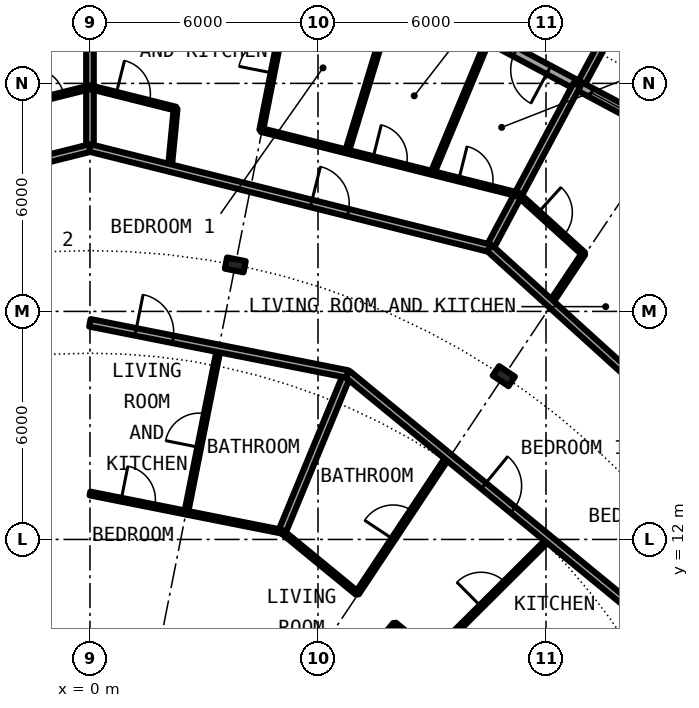
"""IFC4 building model, lengths in metres.
Left out: names, types, materials, properties, quantities, classifications, styles, units other than length and angle.
Written with IfcOpenShell. Run it as: python <this file> out.ifc"""

import sys

from ifc_helpers import new_model, si_unit, direction, frame, frame_2d, origin, origin_2d, place, context, subcontext, project, spatial, rectangle, i_section, extrude, element, fill, save


model = new_model("IFC4")
c1 = context("Model", 3, precision=1e-05, world=origin(), true_north=direction((0.0, 1.0)))
c2 = subcontext(c1, "Body", "Model", "MODEL_VIEW")
j1 = project(units=[si_unit("LENGTHUNIT", "METRE"), si_unit("PLANEANGLEUNIT", "RADIAN")], contexts=[c1])
p1 = place(None, origin())
s1 = spatial("IfcSite", under=j1, at=p1, CompositionType="ELEMENT")
p2 = place(p1, origin())
s2 = spatial("IfcBuilding", under=s1, at=p2, CompositionType="ELEMENT")
p3 = place(p2, frame((0.0, 0.0, 161.6)))
s3 = spatial("IfcBuildingStorey", under=s2, at=p3, CompositionType="ELEMENT", Elevation=161.6)
for number, where, z_axis, x_axis in (
    (1, (10.889, 16.297, 0.0), (0.0, 0.0, 1.0), (0.556, 0.831, 0.0)),
    (2, (3.824, 19.223, 0.0), (0.0, 0.0, 1.0), (0.195, 0.981, 0.0)),
):
    element("IfcColumn", number, at=place(p3, frame(where, z_axis=z_axis, x_axis=x_axis)), inside=s3, PredefinedType="COLUMN", context=c2, shape_type="SweptSolid", body=[
        extrude(i_section(OverallWidth=0.3, OverallDepth=0.5, WebThickness=0.014, FlangeThickness=0.028, FilletRadius=0.027, at=origin_2d()), origin(), (0.0, 0.0, 1.0), 3.05),
    ])
p4 = place(p3, frame((15.167, 22.699, 0.0), z_axis=(0.0, 0.0, 1.0), x_axis=(-0.881915646801, 0.471407246368, 0.0)))
e3 = element("IfcWall", 3, at=p4, inside=s3, PredefinedType="SOLIDWALL", context=c2, shape_type="SweptSolid", body=[
    extrude(rectangle(XDim=5.352, YDim=0.25, at=frame_2d((2.676, 0.0))), origin(), (0.0, 0.0, 1.0), 2.7),
])
p5 = place(p4, frame((0.441, 0.0, 0.3)))
e4 = element("IfcOpeningElement", 4, at=p5, cuts=e3, PredefinedType="OPENING", context=c2, shape_type="SweptSolid", body=[
    extrude(rectangle(XDim=1.8, YDim=2.1, at=frame_2d((0.9, 1.05))), frame((0.0, 0.135, 0.0), z_axis=(0.0, -1.0, 0.0), x_axis=(1.0, 0.0, 0.0)), (0.0, 0.0, 1.0), 0.27),
])
p6 = place(p4, frame((3.51, 0.0, 0.0)))
e5 = element("IfcOpeningElement", 5, at=p6, cuts=e3, PredefinedType="OPENING", context=c2, shape_type="SweptSolid", body=[
    extrude(rectangle(XDim=1.0, YDim=2.2, at=frame_2d((0.5, 1.1))), frame((0.0, 0.135, 0.0), z_axis=(0.0, -1.0, 0.0), x_axis=(1.0, 0.0, 0.0)), (0.0, 0.0, 1.0), 0.27),
])
p7 = place(p3, frame((12.945, 24.029, -0.03), z_axis=(0.0, 0.0, 1.0), x_axis=(0.474424310775, 0.88029629861, 0.0)))
e6 = element("IfcWall", 6, at=p7, inside=s3, PredefinedType="SOLIDWALL", context=c2, shape_type="SweptSolid", body=[
    extrude(rectangle(XDim=3.006, YDim=0.2, at=frame_2d((1.503, 0.0))), origin(), (0.0, 0.0, 1.0), 2.73),
])
p8 = place(p3, frame((0.0, 22.3, 0.0), z_axis=(0.0, 0.0, 1.0), x_axis=(0.0, 1.0, 0.0)))
e7 = element("IfcWall", 7, at=p8, inside=s3, PredefinedType="PARTITIONING", context=c2, shape_type="SweptSolid", body=[
    extrude(rectangle(XDim=4.875, YDim=0.2, at=frame_2d((2.438, 0.0))), origin(), (0.0, 0.0, 1.0), 2.7),
])
p9 = place(p3, frame((2.102, 21.773, 0.0), z_axis=(0.0, 0.0, 1.0), x_axis=(0.09608568494, 0.995373066317, 0.0)))
e8 = element("IfcWall", 8, at=p9, inside=s3, PredefinedType="PARTITIONING", context=c2, shape_type="SweptSolid", body=[
    extrude(rectangle(XDim=1.57, YDim=0.1, at=frame_2d((0.785, 0.0))), origin(), (0.0, 0.0, 1.0), 2.7),
])
p10 = place(p3, frame((2.532, 12.705, 0.0), z_axis=(0.0, 0.0, 1.0), x_axis=(0.195273978699, 0.980748730941, 0.0)))
e9 = element("IfcWall", 9, at=p10, inside=s3, PredefinedType="PARTITIONING", context=c2, shape_type="SweptSolid", body=[
    extrude(rectangle(XDim=4.405, YDim=0.1, at=frame_2d((2.202, 0.0))), origin(), (0.0, 0.0, 1.0), 2.7),
])
p11 = place(p10, frame((1.752, 0.0, 0.0)))
e10 = element("IfcOpeningElement", 10, at=p11, cuts=e9, PredefinedType="OPENING", context=c2, shape_type="SweptSolid", body=[
    extrude(rectangle(XDim=0.9, YDim=2.3, at=frame_2d((0.45, 1.15))), frame((0.0, 0.06, 0.0), z_axis=(0.0, -1.0, 0.0), x_axis=(1.0, 0.0, 0.0)), (0.0, 0.0, 1.0), 0.12),
])
p12 = place(p3, frame((4.507, 22.771, 0.0), z_axis=(0.0, 0.0, 1.0), x_axis=(0.194030211642, 0.980995554001, 0.0)))
e11 = element("IfcWall", 11, at=p12, inside=s3, PredefinedType="PARTITIONING", context=c2, shape_type="SweptSolid", body=[
    extrude(rectangle(XDim=3.962, YDim=0.1, at=frame_2d((1.981, 0.0))), origin(), (0.0, 0.0, 1.0), 2.7),
])
p13 = place(p12, frame((1.531, 0.0, 0.0)))
e12 = element("IfcOpeningElement", 12, at=p13, cuts=e11, PredefinedType="OPENING", context=c2, shape_type="SweptSolid", body=[
    extrude(rectangle(XDim=0.9, YDim=2.3, at=frame_2d((0.45, 1.15))), frame((0.0, 0.06, 0.0), z_axis=(0.0, -1.0, 0.0), x_axis=(1.0, 0.0, 0.0)), (0.0, 0.0, 1.0), 0.12),
])
p14 = place(p3, frame((4.898, 5.968, 0.0), z_axis=(0.0, 0.0, 1.0), x_axis=(0.634401778971, 0.773003481776, 0.0)))
e13 = element("IfcWall", 13, at=p14, inside=s3, PredefinedType="PARTITIONING", context=c2, shape_type="SweptSolid", body=[
    extrude(rectangle(XDim=4.92, YDim=0.1, at=frame_2d((2.46, 0.0))), origin(), (0.0, 0.0, 1.0), 2.7),
])
p15 = place(p14, frame((2.01, 0.0, 0.0)))
e14 = element("IfcOpeningElement", 14, at=p15, cuts=e13, PredefinedType="OPENING", context=c2, shape_type="SweptSolid", body=[
    extrude(rectangle(XDim=0.9, YDim=2.3, at=frame_2d((0.45, 1.15))), frame((0.0, 0.06, 0.0), z_axis=(0.0, -1.0, 0.0), x_axis=(1.0, 0.0, 0.0)), (0.0, 0.0, 1.0), 0.12),
])
p16 = place(p3, frame((5.055, 12.204, 0.0), z_axis=(0.0, 0.0, 1.0), x_axis=(0.38258387732, 0.923920763277, 0.0)))
e15 = element("IfcWall", 15, at=p16, inside=s3, PredefinedType="PARTITIONING", context=c2, shape_type="SweptSolid", body=[
    extrude(rectangle(XDim=4.49, YDim=0.2, at=frame_2d((2.245, 0.0))), origin(), (0.0, 0.0, 1.0), 2.7),
])
p17 = place(p3, frame((6.763, 22.206, 0.0), z_axis=(0.0, 0.0, 1.0), x_axis=(0.291291575636, 0.956634317785, 0.0)))
e16 = element("IfcWall", 16, at=p17, inside=s3, PredefinedType="PARTITIONING", context=c2, shape_type="SweptSolid", body=[
    extrude(rectangle(XDim=3.962, YDim=0.1, at=frame_2d((1.981, 0.0))), origin(), (0.0, 0.0, 1.0), 2.7),
])
p18 = place(p3, frame((7.031, 10.582, 0.0), z_axis=(0.0, 0.0, 1.0), x_axis=(0.553303732327, 0.832979579457, 0.0)))
e17 = element("IfcWall", 17, at=p18, inside=s3, PredefinedType="PARTITIONING", context=c2, shape_type="SweptSolid", body=[
    extrude(rectangle(XDim=4.319, YDim=0.1, at=frame_2d((2.16, 0.0))), origin(), (0.0, 0.0, 1.0), 2.7),
])
p19 = place(p18, frame((1.71, 0.0, 0.0)))
e18 = element("IfcOpeningElement", 18, at=p19, cuts=e17, PredefinedType="OPENING", context=c2, shape_type="SweptSolid", body=[
    extrude(rectangle(XDim=0.9, YDim=2.3, at=frame_2d((0.45, 1.15))), frame((0.0, 0.06, 0.0), z_axis=(0.0, -1.0, 0.0), x_axis=(1.0, 0.0, 0.0)), (0.0, 0.0, 1.0), 0.12),
])
p20 = place(p3, frame((9.013, 21.642, 0.0), z_axis=(0.0, 0.0, 1.0), x_axis=(0.384420204655, 0.923158223845, 0.0)))
e19 = element("IfcWall", 19, at=p20, inside=s3, PredefinedType="PARTITIONING", context=c2, shape_type="SweptSolid", body=[
    extrude(rectangle(XDim=3.73, YDim=0.1, at=frame_2d((1.865, 0.0))), origin(), (0.0, 0.0, 1.0), 2.7),
])
p21 = place(p3, frame((9.148, 9.1, 0.0), z_axis=(0.0, 0.0, 1.0), x_axis=(0.708822693149, 0.705386695138, 0.0)))
e20 = element("IfcWall", 20, at=p21, inside=s3, PredefinedType="PARTITIONING", context=c2, shape_type="SweptSolid", body=[
    extrude(rectangle(XDim=4.121, YDim=0.1, at=frame_2d((2.061, 0.0))), origin(), (0.0, 0.0, 1.0), 2.7),
])
p22 = place(p21, frame((1.611, 0.0, 0.0)))
e21 = element("IfcOpeningElement", 21, at=p22, cuts=e20, PredefinedType="OPENING", context=c2, shape_type="SweptSolid", body=[
    extrude(rectangle(XDim=0.9, YDim=2.3, at=frame_2d((0.45, 1.15))), frame((0.0, 0.06, 0.0), z_axis=(0.0, -1.0, 0.0), x_axis=(1.0, 0.0, 0.0)), (0.0, 0.0, 1.0), 0.12),
])
p23 = place(p3, frame((10.516, 19.665, 0.0), z_axis=(0.0, 0.0, 1.0), x_axis=(0.471388689095, 0.881925565903, 0.0)))
e22 = element("IfcWall", 22, at=p23, inside=s3, PredefinedType="PARTITIONING", context=c2, shape_type="SweptSolid", body=[
    extrude(rectangle(XDim=4.875, YDim=0.2, at=frame_2d((2.438, 0.0))), origin(), (0.0, 0.0, 1.0), 2.7),
])
p24 = place(p3, frame((12.118, 18.211, 0.0), z_axis=(0.0, 0.0, 1.0), x_axis=(0.554125989098, 0.832432813028, 0.0)))
e23 = element("IfcWall", 23, at=p24, inside=s3, PredefinedType="PARTITIONING", context=c2, shape_type="SweptSolid", body=[
    extrude(rectangle(XDim=1.57, YDim=0.1, at=frame_2d((0.785, 0.0))), origin(), (0.0, 0.0, 1.0), 2.7),
])
p25 = place(p3, frame((5.058, 12.203, 0.0), z_axis=(0.0, 0.0, 1.0), x_axis=(0.772764723682, -0.634692588449, 0.0)))
e24 = element("IfcWall", 24, at=p25, inside=s3, PredefinedType="PARTITIONING", context=c2, shape_type="SweptSolid", body=[
    extrude(rectangle(XDim=2.557, YDim=0.1, at=frame_2d((1.278, 0.0))), origin(), (0.0, 0.0, 1.0), 2.7),
])
p26 = place(p3, frame((8.019, 9.771, 0.0), z_axis=(0.0, 0.0, 1.0), x_axis=(0.772730269942, -0.634734534995, 0.0)))
e25 = element("IfcWall", 25, at=p26, inside=s3, PredefinedType="PARTITIONING", context=c2, shape_type="SweptSolid", body=[
    extrude(rectangle(XDim=1.065, YDim=0.1, at=frame_2d((0.532, 0.0))), origin(), (0.0, 0.0, 1.0), 2.7),
])
p27 = place(p3, frame((0.0, 13.209, 0.0), z_axis=(0.0, 0.0, 1.0), x_axis=(0.980766092797, -0.195186759846, 0.0)))
e26 = element("IfcWall", 26, at=p27, inside=s3, PredefinedType="PARTITIONING", context=c2, shape_type="SweptSolid", body=[
    extrude(rectangle(XDim=2.577, YDim=0.1, at=frame_2d((1.288, 0.0))), origin(), (0.0, 0.0, 1.0), 2.7),
])
p28 = place(p27, frame((0.838, 0.0, 0.0)))
e27 = element("IfcOpeningElement", 27, at=p28, cuts=e26, PredefinedType="OPENING", context=c2, shape_type="SweptSolid", body=[
    extrude(rectangle(XDim=0.9, YDim=2.3, at=frame_2d((0.45, 1.15))), frame((0.0, 0.06, 0.0), z_axis=(0.0, -1.0, 0.0), x_axis=(1.0, 0.0, 0.0)), (0.0, 0.0, 1.0), 0.12),
])
p29 = place(p3, frame((6.773, 16.353, 0.0), z_axis=(0.0, 0.0, 1.0), x_axis=(0.773034536097, -0.634363938131, 0.0)))
e28 = element("IfcWall", 28, at=p29, inside=s3, PredefinedType="PARTITIONING", context=c2, shape_type="SweptSolid", body=[
    extrude(rectangle(XDim=10.277, YDim=0.2, at=frame_2d((5.138, 0.0))), origin(), (0.0, 0.0, 1.0), 2.7),
])
p30 = place(p29, frame((4.638, 0.0, 0.0)))
e29 = element("IfcOpeningElement", 29, at=p30, cuts=e28, PredefinedType="OPENING", context=c2, shape_type="SweptSolid", body=[
    extrude(rectangle(XDim=1.0, YDim=2.3, at=frame_2d((0.5, 1.15))), frame((0.0, 0.11, 0.0), z_axis=(0.0, -1.0, 0.0), x_axis=(1.0, 0.0, 0.0)), (0.0, 0.0, 1.0), 0.22),
])
p31 = place(p3, frame((-0.002, 17.7, 0.0), z_axis=(0.0, 0.0, 1.0), x_axis=(0.980804334721, -0.194994505033, 0.0)))
e30 = element("IfcWall", 30, at=p31, inside=s3, PredefinedType="PARTITIONING", context=c2, shape_type="SweptSolid", body=[
    extrude(rectangle(XDim=6.907, YDim=0.2, at=frame_2d((3.454, 0.0))), origin(), (0.0, 0.0, 1.0), 2.7),
])
p32 = place(p31, frame((1.228, 0.0, 0.0)))
e31 = element("IfcOpeningElement", 31, at=p32, cuts=e30, PredefinedType="OPENING", context=c2, shape_type="SweptSolid", body=[
    extrude(rectangle(XDim=1.0, YDim=2.3, at=frame_2d((0.5, 1.15))), frame((0.0, 0.11, 0.0), z_axis=(0.0, -1.0, 0.0), x_axis=(1.0, 0.0, 0.0)), (0.0, 0.0, 1.0), 0.22),
])
p33 = place(p3, frame((-10.512, 19.667, 0.0), z_axis=(0.0, 0.0, 1.0), x_axis=(0.970086843848, 0.242758141765, 0.0)))
e32 = element("IfcWall", 32, at=p33, inside=s3, PredefinedType="PARTITIONING", context=c2, shape_type="SweptSolid", body=[
    extrude(rectangle(XDim=10.842, YDim=0.2, at=frame_2d((5.421, 0.0))), origin(), (0.0, 0.0, 1.0), 2.7),
])
p34 = place(p33, frame((6.002, 0.0, 0.0)))
e33 = element("IfcOpeningElement", 33, at=p34, cuts=e32, PredefinedType="OPENING", context=c2, shape_type="SweptSolid", body=[
    extrude(rectangle(XDim=1.0, YDim=2.3, at=frame_2d((0.5, 1.15))), frame((0.0, 0.11, 0.0), z_axis=(0.0, -1.0, 0.0), x_axis=(1.0, 0.0, 0.0)), (0.0, 0.0, 1.0), 0.22),
])
p35 = place(p3, frame((0.0, 22.3, 0.0), z_axis=(0.0, 0.0, 1.0), x_axis=(0.969975381822, -0.243203122222, 0.0)))
e34 = element("IfcWall", 34, at=p35, inside=s3, PredefinedType="PARTITIONING", context=c2, shape_type="SweptSolid", body=[
    extrude(rectangle(XDim=10.843, YDim=0.2, at=frame_2d((5.421, 0.0))), origin(), (0.0, 0.0, 1.0), 2.7),
])
p36 = place(p35, frame((6.002, 0.0, 0.0)))
e35 = element("IfcOpeningElement", 35, at=p36, cuts=e34, PredefinedType="OPENING", context=c2, shape_type="SweptSolid", body=[
    extrude(rectangle(XDim=1.0, YDim=2.3, at=frame_2d((0.5, 1.15))), frame((0.0, 0.11, 0.0), z_axis=(0.0, -1.0, 0.0), x_axis=(1.0, 0.0, 0.0)), (0.0, 0.0, 1.0), 0.22),
])
p37 = place(p3, frame((10.512, 19.667, 0.0), z_axis=(0.0, 0.0, 1.0), x_axis=(0.740849323054, -0.67167125927, 0.0)))
e36 = element("IfcWall", 36, at=p37, inside=s3, PredefinedType="PARTITIONING", context=c2, shape_type="SweptSolid", body=[
    extrude(rectangle(XDim=10.842, YDim=0.2, at=frame_2d((5.421, 0.0))), origin(), (0.0, 0.0, 1.0), 2.7),
])
p38 = place(p37, frame((6.003, 0.0, 0.0)))
e37 = element("IfcOpeningElement", 37, at=p38, cuts=e36, PredefinedType="OPENING", context=c2, shape_type="SweptSolid", body=[
    extrude(rectangle(XDim=1.0, YDim=2.3, at=frame_2d((0.5, 1.15))), frame((0.0, 0.11, 0.0), z_axis=(0.0, -1.0, 0.0), x_axis=(1.0, 0.0, 0.0)), (0.0, 0.0, 1.0), 0.22),
])
p39 = place(p3, frame((-6.76, 22.206, 0.0), z_axis=(0.0, 0.0, 1.0), x_axis=(0.970070358667, 0.242824008772, 0.0)))
e38 = element("IfcWall", 38, at=p39, inside=s3, PredefinedType="PARTITIONING", context=c2, shape_type="SweptSolid", body=[
    extrude(rectangle(XDim=6.972, YDim=0.1, at=frame_2d((3.486, 0.0))), origin(), (0.0, 0.0, 1.0), 2.7),
])
p40 = place(p39, frame((3.037, 0.0, 0.0)))
e39 = element("IfcOpeningElement", 39, at=p40, cuts=e38, PredefinedType="OPENING", context=c2, shape_type="SweptSolid", body=[
    extrude(rectangle(XDim=0.9, YDim=2.3, at=frame_2d((0.45, 1.15))), frame((0.0, 0.06, 0.0), z_axis=(0.0, -1.0, 0.0), x_axis=(1.0, 0.0, 0.0)), (0.0, 0.0, 1.0), 0.12),
])
p41 = place(p39, frame((5.357, 0.0, 0.0)))
e40 = element("IfcOpeningElement", 40, at=p41, cuts=e38, PredefinedType="OPENING", context=c2, shape_type="SweptSolid", body=[
    extrude(rectangle(XDim=0.9, YDim=2.3, at=frame_2d((0.45, 1.15))), frame((0.0, 0.06, 0.0), z_axis=(0.0, -1.0, 0.0), x_axis=(1.0, 0.0, 0.0)), (0.0, 0.0, 1.0), 0.12),
])
p42 = place(p3, frame((0.003, 23.899, 0.0), z_axis=(0.0, 0.0, 1.0), x_axis=(0.970074448647, -0.242807668911, 0.0)))
e41 = element("IfcWall", 41, at=p42, inside=s3, PredefinedType="PARTITIONING", context=c2, shape_type="SweptSolid", body=[
    extrude(rectangle(XDim=2.323, YDim=0.1, at=frame_2d((1.161, 0.0))), origin(), (0.0, 0.0, 1.0), 2.7),
])
p43 = place(p42, frame((0.708, 0.0, 0.0)))
e42 = element("IfcOpeningElement", 42, at=p43, cuts=e41, PredefinedType="OPENING", context=c2, shape_type="SweptSolid", body=[
    extrude(rectangle(XDim=0.9, YDim=2.3, at=frame_2d((0.45, 1.15))), frame((0.0, 0.06, 0.0), z_axis=(0.0, -1.0, 0.0), x_axis=(1.0, 0.0, 0.0)), (0.0, 0.0, 1.0), 0.12),
])
p44 = place(p3, frame((4.507, 22.771, 0.0), z_axis=(0.0, 0.0, 1.0), x_axis=(0.970020829306, -0.243021790611, 0.0)))
e43 = element("IfcWall", 43, at=p44, inside=s3, PredefinedType="PARTITIONING", context=c2, shape_type="SweptSolid", body=[
    extrude(rectangle(XDim=6.971, YDim=0.1, at=frame_2d((3.485, 0.0))), origin(), (0.0, 0.0, 1.0), 2.7),
])
p45 = place(p44, frame((3.031, 0.0, 0.0)))
e44 = element("IfcOpeningElement", 44, at=p45, cuts=e43, PredefinedType="OPENING", context=c2, shape_type="SweptSolid", body=[
    extrude(rectangle(XDim=0.9, YDim=2.3, at=frame_2d((0.45, 1.15))), frame((0.0, 0.06, 0.0), z_axis=(0.0, -1.0, 0.0), x_axis=(1.0, 0.0, 0.0)), (0.0, 0.0, 1.0), 0.12),
])
p46 = place(p44, frame((5.358, 0.0, 0.0)))
e45 = element("IfcOpeningElement", 45, at=p46, cuts=e43, PredefinedType="OPENING", context=c2, shape_type="SweptSolid", body=[
    extrude(rectangle(XDim=0.9, YDim=2.3, at=frame_2d((0.45, 1.15))), frame((0.0, 0.06, 0.0), z_axis=(0.0, -1.0, 0.0), x_axis=(1.0, 0.0, 0.0)), (0.0, 0.0, 1.0), 0.12),
])
p47 = place(p3, frame((11.271, 21.074, 0.0), z_axis=(0.0, 0.0, 1.0), x_axis=(0.74087097024, -0.671647381783, 0.0)))
e46 = element("IfcWall", 46, at=p47, inside=s3, PredefinedType="PARTITIONING", context=c2, shape_type="SweptSolid", body=[
    extrude(rectangle(XDim=2.324, YDim=0.1, at=frame_2d((1.162, 0.0))), origin(), (0.0, 0.0, 1.0), 2.7),
])
p48 = place(p47, frame((0.705, 0.0, 0.0)))
e47 = element("IfcOpeningElement", 47, at=p48, cuts=e46, PredefinedType="OPENING", context=c2, shape_type="SweptSolid", body=[
    extrude(rectangle(XDim=0.9, YDim=2.3, at=frame_2d((0.45, 1.15))), frame((0.0, 0.06, 0.0), z_axis=(0.0, -1.0, 0.0), x_axis=(1.0, 0.0, 0.0)), (0.0, 0.0, 1.0), 0.12),
])
p49 = place(p3, frame((5.035, 12.208, 0.0), z_axis=(0.0, 0.0, 1.0), x_axis=(-0.980857356895, 0.194727618547, 0.0)))
e48 = element("IfcWall", 48, at=p49, inside=s3, PredefinedType="PARTITIONING", context=c2, shape_type="SweptSolid", body=[
    extrude(rectangle(XDim=2.536, YDim=0.1, at=frame_2d((1.268, 0.0))), origin(), (0.0, 0.0, 1.0), 2.7),
])
p50 = place(p5, origin())
e49 = element("IfcWindow", 49, at=p50, inside=s3, PartitioningType="SINGLE_PANEL", PredefinedType="WINDOW", context=c2, shape_type="SweptSolid", body=[
    extrude(rectangle(XDim=1.8, YDim=2.1, at=frame_2d((0.9, 1.05))), frame((0.0, 0.03, 0.0), z_axis=(0.0, -1.0, 0.0), x_axis=(1.0, 0.0, 0.0)), (0.0, 0.0, 1.0), 0.06),
])
fill(e4, e49)
p51 = place(p6, origin())
e50 = element("IfcDoor", 50, at=p51, inside=s3, OperationType="SINGLE_SWING_LEFT", PredefinedType="DOOR", context=c2, shape_type="SweptSolid", body=[
    extrude(rectangle(XDim=1.0, YDim=2.2, at=frame_2d((0.5, 1.1))), frame((0.0, 0.025, 0.0), z_axis=(0.0, -1.0, 0.0), x_axis=(1.0, 0.0, 0.0)), (0.0, 0.0, 1.0), 0.05),
])
fill(e5, e50)
p52 = place(p48, origin())
e51 = element("IfcDoor", 51, at=p52, inside=s3, OperationType="SINGLE_SWING_LEFT", PredefinedType="DOOR", context=c2, shape_type="SweptSolid", body=[
    extrude(rectangle(XDim=0.9, YDim=2.3, at=frame_2d((0.45, 1.15))), frame((0.0, 0.025, 0.0), z_axis=(0.0, -1.0, 0.0), x_axis=(1.0, 0.0, 0.0)), (0.0, 0.0, 1.0), 0.05),
])
fill(e47, e51)
p53 = place(p36, origin())
e52 = element("IfcDoor", 52, at=p53, inside=s3, OperationType="SINGLE_SWING_RIGHT", PredefinedType="DOOR", context=c2, shape_type="SweptSolid", body=[
    extrude(rectangle(XDim=1.0, YDim=2.3, at=frame_2d((0.5, 1.15))), frame((0.0, 0.025, 0.0), z_axis=(0.0, -1.0, 0.0), x_axis=(1.0, 0.0, 0.0)), (0.0, 0.0, 1.0), 0.05),
])
fill(e35, e52)
p54 = place(p43, origin())
e53 = element("IfcDoor", 53, at=p54, inside=s3, OperationType="SINGLE_SWING_LEFT", PredefinedType="DOOR", context=c2, shape_type="SweptSolid", body=[
    extrude(rectangle(XDim=0.9, YDim=2.3, at=frame_2d((0.45, 1.15))), frame((0.0, 0.025, 0.0), z_axis=(0.0, -1.0, 0.0), x_axis=(1.0, 0.0, 0.0)), (0.0, 0.0, 1.0), 0.05),
])
fill(e42, e53)
p55 = place(p13, origin())
e54 = element("IfcDoor", 54, at=p55, inside=s3, OperationType="SINGLE_SWING_RIGHT", PredefinedType="DOOR", context=c2, shape_type="SweptSolid", body=[
    extrude(rectangle(XDim=0.9, YDim=2.3, at=frame_2d((0.45, 1.15))), frame((0.0, 0.025, 0.0), z_axis=(0.0, -1.0, 0.0), x_axis=(1.0, 0.0, 0.0)), (0.0, 0.0, 1.0), 0.05),
])
fill(e12, e54)
p56 = place(p45, origin())
e55 = element("IfcDoor", 55, at=p56, inside=s3, OperationType="SINGLE_SWING_LEFT", PredefinedType="DOOR", context=c2, shape_type="SweptSolid", body=[
    extrude(rectangle(XDim=0.9, YDim=2.3, at=frame_2d((0.45, 1.15))), frame((0.0, 0.025, 0.0), z_axis=(0.0, -1.0, 0.0), x_axis=(1.0, 0.0, 0.0)), (0.0, 0.0, 1.0), 0.05),
])
fill(e44, e55)
p57 = place(p46, origin())
e56 = element("IfcDoor", 56, at=p57, inside=s3, OperationType="SINGLE_SWING_RIGHT", PredefinedType="DOOR", context=c2, shape_type="SweptSolid", body=[
    extrude(rectangle(XDim=0.9, YDim=2.3, at=frame_2d((0.45, 1.15))), frame((0.0, 0.025, 0.0), z_axis=(0.0, -1.0, 0.0), x_axis=(1.0, 0.0, 0.0)), (0.0, 0.0, 1.0), 0.05),
])
fill(e45, e56)
p58 = place(p41, origin())
e57 = element("IfcDoor", 57, at=p58, inside=s3, OperationType="SINGLE_SWING_RIGHT", PredefinedType="DOOR", context=c2, shape_type="SweptSolid", body=[
    extrude(rectangle(XDim=0.9, YDim=2.3, at=frame_2d((0.45, 1.15))), frame((0.0, 0.025, 0.0), z_axis=(0.0, -1.0, 0.0), x_axis=(1.0, 0.0, 0.0)), (0.0, 0.0, 1.0), 0.05),
])
fill(e40, e57)
p59 = place(p30, origin())
e58 = element("IfcDoor", 58, at=p59, inside=s3, OperationType="SINGLE_SWING_RIGHT", PredefinedType="DOOR", context=c2, shape_type="SweptSolid", body=[
    extrude(rectangle(XDim=1.0, YDim=2.3, at=frame_2d((0.5, 1.15))), frame((0.0, 0.025, 0.0), z_axis=(0.0, -1.0, 0.0), x_axis=(1.0, 0.0, 0.0)), (0.0, 0.0, 1.0), 0.05),
])
fill(e29, e58)
p60 = place(p19, origin())
e59 = element("IfcDoor", 59, at=p60, inside=s3, OperationType="SINGLE_SWING_LEFT", PredefinedType="DOOR", context=c2, shape_type="SweptSolid", body=[
    extrude(rectangle(XDim=0.9, YDim=2.3, at=frame_2d((0.45, 1.15))), frame((0.0, 0.025, 0.0), z_axis=(0.0, -1.0, 0.0), x_axis=(1.0, 0.0, 0.0)), (0.0, 0.0, 1.0), 0.05),
])
fill(e18, e59)
p61 = place(p22, origin())
e60 = element("IfcDoor", 60, at=p61, inside=s3, OperationType="SINGLE_SWING_LEFT", PredefinedType="DOOR", context=c2, shape_type="SweptSolid", body=[
    extrude(rectangle(XDim=0.9, YDim=2.3, at=frame_2d((0.45, 1.15))), frame((0.0, 0.025, 0.0), z_axis=(0.0, -1.0, 0.0), x_axis=(1.0, 0.0, 0.0)), (0.0, 0.0, 1.0), 0.05),
])
fill(e21, e60)
p62 = place(p32, origin())
e61 = element("IfcDoor", 61, at=p62, inside=s3, OperationType="SINGLE_SWING_LEFT", PredefinedType="DOOR", context=c2, shape_type="SweptSolid", body=[
    extrude(rectangle(XDim=1.0, YDim=2.3, at=frame_2d((0.5, 1.15))), frame((0.0, 0.025, 0.0), z_axis=(0.0, -1.0, 0.0), x_axis=(1.0, 0.0, 0.0)), (0.0, 0.0, 1.0), 0.05),
])
fill(e31, e61)
p63 = place(p11, origin())
e62 = element("IfcDoor", 62, at=p63, inside=s3, OperationType="SINGLE_SWING_RIGHT", PredefinedType="DOOR", context=c2, shape_type="SweptSolid", body=[
    extrude(rectangle(XDim=0.9, YDim=2.3, at=frame_2d((0.45, 1.15))), frame((0.0, 0.025, 0.0), z_axis=(0.0, -1.0, 0.0), x_axis=(1.0, 0.0, 0.0)), (0.0, 0.0, 1.0), 0.05),
])
fill(e10, e62)
p64 = place(p28, origin())
e63 = element("IfcDoor", 63, at=p64, inside=s3, OperationType="SINGLE_SWING_LEFT", PredefinedType="DOOR", context=c2, shape_type="SweptSolid", body=[
    extrude(rectangle(XDim=0.9, YDim=2.3, at=frame_2d((0.45, 1.15))), frame((0.0, 0.025, 0.0), z_axis=(0.0, -1.0, 0.0), x_axis=(1.0, 0.0, 0.0)), (0.0, 0.0, 1.0), 0.05),
])
fill(e27, e63)
save(model, sys.argv[1])
